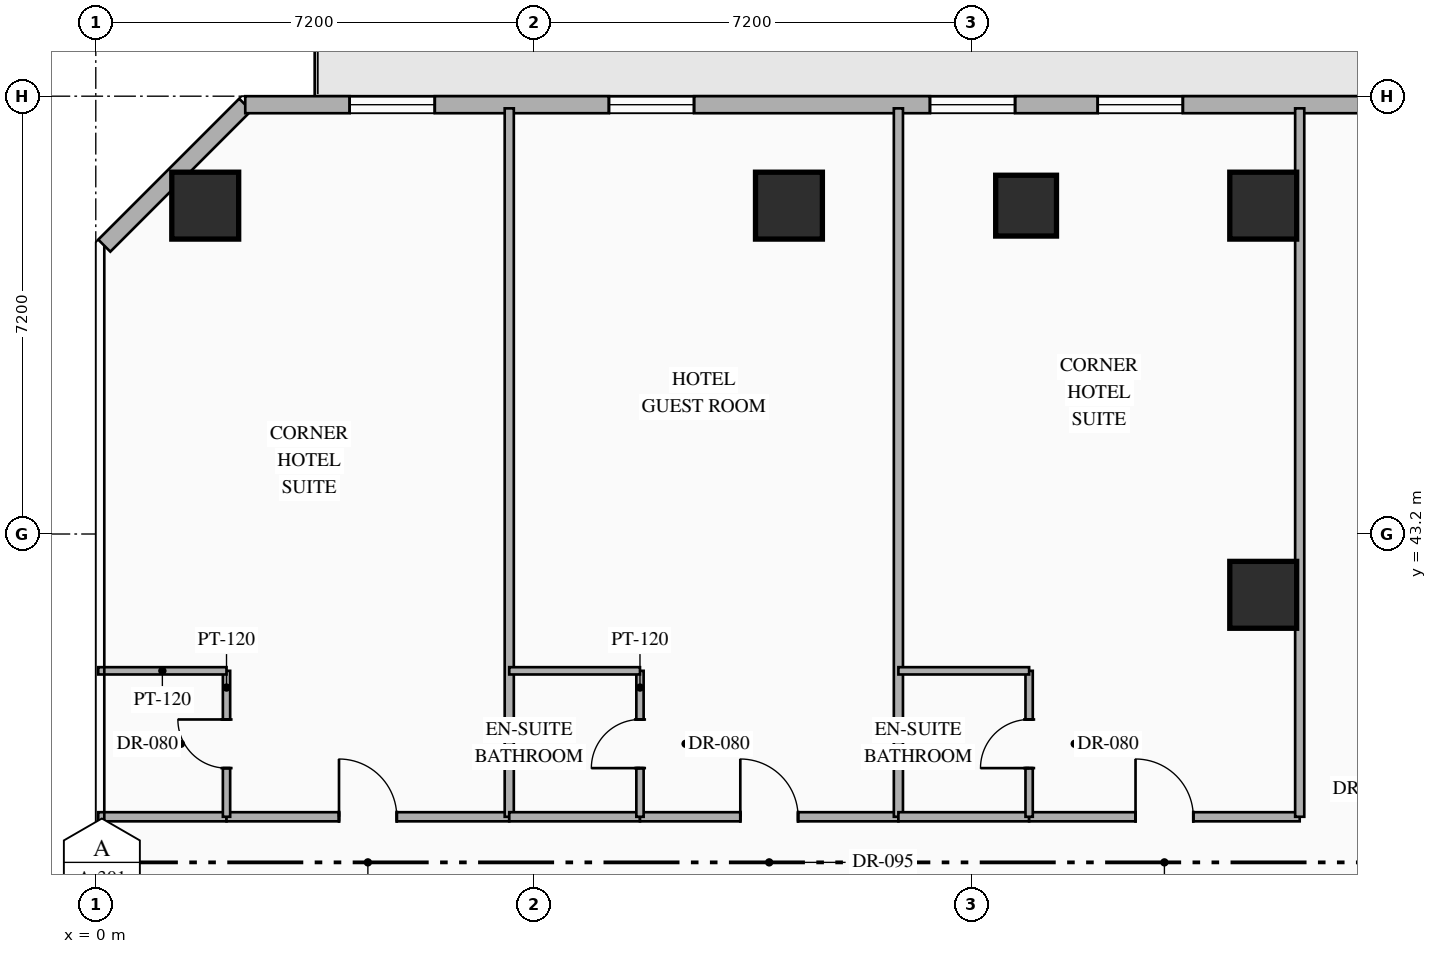
"""IFC4 building model, lengths in metres.
Left out: names, types, materials, properties, quantities, classifications, styles, units other than length and angle.
Written with IfcOpenShell. Run it as: python <this file> out.ifc"""

import sys

from ifc_helpers import new_model, si_unit, direction, frame, frame_2d, origin, origin_2d, place, context, subcontext, project, spatial, rectangle, hollow_rectangle, extrude, element, fill, save


model = new_model("IFC4")
c1 = context("Model", 3, precision=1e-05, world=origin(), true_north=direction((0.0, 1.0)))
c2 = subcontext(c1, "Body", "Model", "MODEL_VIEW")
j1 = project(units=[si_unit("LENGTHUNIT", "METRE"), si_unit("PLANEANGLEUNIT", "RADIAN")], contexts=[c1])
p1 = place(None, origin())
s1 = spatial("IfcSite", under=j1, at=p1, CompositionType="ELEMENT")
p2 = place(p1, origin())
s2 = spatial("IfcBuilding", under=s1, at=p2, CompositionType="ELEMENT")
p3 = place(p2, frame((0.0, 0.0, 63.4)))
s3 = spatial("IfcBuildingStorey", under=s2, at=p3, CompositionType="ELEMENT", Elevation=63.4)
for number, where, z_axis, x_axis in (
    (1, (1.8, 48.6, 0.0), (0.0, 0.0, 1.0), (1.0, 0.0, 0.0)),
    (2, (11.4, 48.6, 0.0), (0.0, 0.0, 1.0), (1.0, 0.0, 0.0)),
    (3, (19.2, 48.6, 0.0), (0.0, 0.0, 1.0), (1.0, 0.0, 0.0)),
    (4, (19.2, 42.2, 0.0), (0.0, 0.0, 1.0), (1.0, 0.0, 0.0)),
):
    element("IfcColumn", number, at=place(p3, frame(where, z_axis=z_axis, x_axis=x_axis)), inside=s3, PredefinedType="COLUMN", context=c2, shape_type="SweptSolid", body=[
        extrude(hollow_rectangle(XDim=1.1, YDim=1.1, WallThickness=0.04, at=origin_2d()), origin(), (0.0, 0.0, 1.0), 3.35),
    ])
p4 = place(p3, frame((15.3, 48.6, 0.0), z_axis=(0.0, 0.0, 1.0), x_axis=(1.0, 0.0, 0.0)))
e5 = element("IfcColumn", 5, at=p4, inside=s3, PredefinedType="COLUMN", context=c2, shape_type="SweptSolid", body=[
    extrude(hollow_rectangle(XDim=1.0, YDim=1.0, WallThickness=0.038, at=origin_2d()), origin(), (0.0, 0.0, 1.0), 3.35),
])
p5 = place(p3, frame((0.14, 47.942, 0.0), z_axis=(0.0, 0.0, 1.0), x_axis=(0.707106781187, 0.707106781187, 0.0)))
e6 = element("IfcWall", 6, at=p5, inside=s3, PredefinedType="STANDARD", context=c2, shape_type="SweptSolid", body=[
    extrude(rectangle(XDim=3.278, YDim=0.28, at=frame_2d((1.639, 0.0))), origin(), (0.0, 0.0, 1.0), 3.13),
])
p6 = place(p3, frame((2.458, 50.26, 0.0), z_axis=(0.0, 0.0, 1.0), x_axis=(1.0, 0.0, 0.0)))
e7 = element("IfcWall", 7, at=p6, inside=s3, PredefinedType="STANDARD", context=c2, shape_type="SweptSolid", body=[
    extrude(rectangle(XDim=40.084, YDim=0.28, at=frame_2d((20.042, 0.0))), origin(), (0.0, 0.0, 1.0), 3.13),
])
p7 = place(p6, frame((25.905, 0.0, 0.0)))
e8 = element("IfcOpeningElement", 8, at=p7, cuts=e7, PredefinedType="OPENING", context=c2, shape_type="SweptSolid", body=[
    extrude(rectangle(XDim=1.1, YDim=2.2, at=frame_2d((0.55, 1.1))), frame((0.0, 0.15, 0.0), z_axis=(0.0, -1.0, 0.0), x_axis=(1.0, 0.0, 0.0)), (0.0, 0.0, 1.0), 0.3),
])
p8 = place(p6, frame((1.717, 0.0, 0.85)))
e9 = element("IfcOpeningElement", 9, at=p8, cuts=e7, PredefinedType="OPENING", context=c2, shape_type="SweptSolid", body=[
    extrude(rectangle(XDim=1.4, YDim=1.8, at=frame_2d((0.7, 0.9))), frame((0.0, 0.15, 0.0), z_axis=(0.0, -1.0, 0.0), x_axis=(1.0, 0.0, 0.0)), (0.0, 0.0, 1.0), 0.3),
])
p9 = place(p6, frame((5.981, 0.0, 0.85)))
e10 = element("IfcOpeningElement", 10, at=p9, cuts=e7, PredefinedType="OPENING", context=c2, shape_type="SweptSolid", body=[
    extrude(rectangle(XDim=1.4, YDim=1.8, at=frame_2d((0.7, 0.9))), frame((0.0, 0.15, 0.0), z_axis=(0.0, -1.0, 0.0), x_axis=(1.0, 0.0, 0.0)), (0.0, 0.0, 1.0), 0.3),
])
p10 = place(p6, frame((11.261, 0.0, 0.85)))
e11 = element("IfcOpeningElement", 11, at=p10, cuts=e7, PredefinedType="OPENING", context=c2, shape_type="SweptSolid", body=[
    extrude(rectangle(XDim=1.4, YDim=1.8, at=frame_2d((0.7, 0.9))), frame((0.0, 0.15, 0.0), z_axis=(0.0, -1.0, 0.0), x_axis=(1.0, 0.0, 0.0)), (0.0, 0.0, 1.0), 0.3),
])
p11 = place(p6, frame((14.02, 0.0, 0.85)))
e12 = element("IfcOpeningElement", 12, at=p11, cuts=e7, PredefinedType="OPENING", context=c2, shape_type="SweptSolid", body=[
    extrude(rectangle(XDim=1.4, YDim=1.8, at=frame_2d((0.7, 0.9))), frame((0.0, 0.15, 0.0), z_axis=(0.0, -1.0, 0.0), x_axis=(1.0, 0.0, 0.0)), (0.0, 0.0, 1.0), 0.3),
])
p12 = place(p6, frame((20.789, 0.0, 0.85)))
e13 = element("IfcOpeningElement", 13, at=p12, cuts=e7, PredefinedType="OPENING", context=c2, shape_type="SweptSolid", body=[
    extrude(rectangle(XDim=1.4, YDim=1.8, at=frame_2d((0.7, 0.9))), frame((0.0, 0.15, 0.0), z_axis=(0.0, -1.0, 0.0), x_axis=(1.0, 0.0, 0.0)), (0.0, 0.0, 1.0), 0.3),
])
p13 = place(p6, frame((32.703, 0.0, 0.85)))
e14 = element("IfcOpeningElement", 14, at=p13, cuts=e7, PredefinedType="OPENING", context=c2, shape_type="SweptSolid", body=[
    extrude(rectangle(XDim=1.4, YDim=1.8, at=frame_2d((0.7, 0.9))), frame((0.0, 0.15, 0.0), z_axis=(0.0, -1.0, 0.0), x_axis=(1.0, 0.0, 0.0)), (0.0, 0.0, 1.0), 0.3),
])
p14 = place(p6, frame((36.967, 0.0, 0.85)))
e15 = element("IfcOpeningElement", 15, at=p14, cuts=e7, PredefinedType="OPENING", context=c2, shape_type="SweptSolid", body=[
    extrude(rectangle(XDim=1.4, YDim=1.8, at=frame_2d((0.7, 0.9))), frame((0.0, 0.15, 0.0), z_axis=(0.0, -1.0, 0.0), x_axis=(1.0, 0.0, 0.0)), (0.0, 0.0, 1.0), 0.3),
])
p15 = place(p3, frame((0.04, 38.55, 0.0), z_axis=(0.0, 0.0, 1.0), x_axis=(1.0, 0.0, 0.0)))
e16 = element("IfcWall", 16, at=p15, inside=s3, PredefinedType="PARTITIONING", context=c2, shape_type="SweptSolid", body=[
    extrude(rectangle(XDim=2.11, YDim=0.15, at=frame_2d((1.055, 0.0))), origin(), (0.0, 0.0, 1.0), 2.775),
])
p16 = place(p3, frame((2.15, 38.55, 0.0), z_axis=(0.0, 0.0, 1.0), x_axis=(1.0, 0.0, 0.0)))
e17 = element("IfcWall", 17, at=p16, inside=s3, PredefinedType="PARTITIONING", context=c2, shape_type="SweptSolid", body=[
    extrude(rectangle(XDim=4.65, YDim=0.15, at=frame_2d((2.325, 0.0))), origin(), (0.0, 0.0, 1.0), 2.775),
])
p17 = place(p16, frame((1.85, 0.0, 0.0)))
e18 = element("IfcOpeningElement", 18, at=p17, cuts=e17, PredefinedType="OPENING", context=c2, shape_type="SweptSolid", body=[
    extrude(rectangle(XDim=0.95, YDim=2.15, at=frame_2d((0.475, 1.075))), frame((0.0, 0.085, 0.0), z_axis=(0.0, -1.0, 0.0), x_axis=(1.0, 0.0, 0.0)), (0.0, 0.0, 1.0), 0.17),
])
p18 = place(p3, frame((2.15, 38.55, 0.0), z_axis=(0.0, 0.0, 1.0), x_axis=(0.0, 1.0, 0.0)))
e19 = element("IfcWall", 19, at=p18, inside=s3, PredefinedType="PARTITIONING", context=c2, shape_type="SweptSolid", body=[
    extrude(rectangle(XDim=2.4, YDim=0.12, at=frame_2d((1.2, 0.0))), origin(), (0.0, 0.0, 1.0), 3.13),
])
p19 = place(p18, frame((0.8, 0.0, 0.0)))
e20 = element("IfcOpeningElement", 20, at=p19, cuts=e19, PredefinedType="OPENING", context=c2, shape_type="SweptSolid", body=[
    extrude(rectangle(XDim=0.8, YDim=2.06, at=frame_2d((0.4, 1.03))), frame((0.0, 0.07, 0.0), z_axis=(0.0, -1.0, 0.0), x_axis=(1.0, 0.0, 0.0)), (0.0, 0.0, 1.0), 0.14),
])
p20 = place(p3, frame((0.04, 40.95, 0.0), z_axis=(0.0, 0.0, 1.0), x_axis=(1.0, 0.0, 0.0)))
e21 = element("IfcWall", 21, at=p20, inside=s3, PredefinedType="PARTITIONING", context=c2, shape_type="SweptSolid", body=[
    extrude(rectangle(XDim=2.11, YDim=0.12, at=frame_2d((1.055, 0.0))), origin(), (0.0, 0.0, 1.0), 2.775),
])
p21 = place(p3, frame((6.8, 38.55, 0.0), z_axis=(0.0, 0.0, 1.0), x_axis=(0.0, 1.0, 0.0)))
e22 = element("IfcWall", 22, at=p21, inside=s3, PredefinedType="PARTITIONING", context=c2, shape_type="SweptSolid", body=[
    extrude(rectangle(XDim=11.65, YDim=0.15, at=frame_2d((5.825, 0.0))), origin(), (0.0, 0.0, 1.0), 3.13),
])
p22 = place(p3, frame((6.8, 38.55, 0.0), z_axis=(0.0, 0.0, 1.0), x_axis=(1.0, 0.0, 0.0)))
e23 = element("IfcWall", 23, at=p22, inside=s3, PredefinedType="PARTITIONING", context=c2, shape_type="SweptSolid", body=[
    extrude(rectangle(XDim=2.15, YDim=0.15, at=frame_2d((1.075, 0.0))), origin(), (0.0, 0.0, 1.0), 2.775),
])
p23 = place(p3, frame((8.95, 38.55, 0.0), z_axis=(0.0, 0.0, 1.0), x_axis=(1.0, 0.0, 0.0)))
e24 = element("IfcWall", 24, at=p23, inside=s3, PredefinedType="PARTITIONING", context=c2, shape_type="SweptSolid", body=[
    extrude(rectangle(XDim=4.25, YDim=0.15, at=frame_2d((2.125, 0.0))), origin(), (0.0, 0.0, 1.0), 2.775),
])
p24 = place(p23, frame((1.65, 0.0, 0.0)))
e25 = element("IfcOpeningElement", 25, at=p24, cuts=e24, PredefinedType="OPENING", context=c2, shape_type="SweptSolid", body=[
    extrude(rectangle(XDim=0.95, YDim=2.15, at=frame_2d((0.475, 1.075))), frame((0.0, 0.085, 0.0), z_axis=(0.0, -1.0, 0.0), x_axis=(1.0, 0.0, 0.0)), (0.0, 0.0, 1.0), 0.17),
])
p25 = place(p3, frame((8.95, 38.55, 0.0), z_axis=(0.0, 0.0, 1.0), x_axis=(0.0, 1.0, 0.0)))
e26 = element("IfcWall", 26, at=p25, inside=s3, PredefinedType="PARTITIONING", context=c2, shape_type="SweptSolid", body=[
    extrude(rectangle(XDim=2.4, YDim=0.12, at=frame_2d((1.2, 0.0))), origin(), (0.0, 0.0, 1.0), 3.13),
])
p26 = place(p25, frame((0.8, 0.0, 0.0)))
e27 = element("IfcOpeningElement", 27, at=p26, cuts=e26, PredefinedType="OPENING", context=c2, shape_type="SweptSolid", body=[
    extrude(rectangle(XDim=0.8, YDim=2.06, at=frame_2d((0.4, 1.03))), frame((0.0, 0.07, 0.0), z_axis=(0.0, -1.0, 0.0), x_axis=(1.0, 0.0, 0.0)), (0.0, 0.0, 1.0), 0.14),
])
p27 = place(p3, frame((6.8, 40.95, 0.0), z_axis=(0.0, 0.0, 1.0), x_axis=(1.0, 0.0, 0.0)))
e28 = element("IfcWall", 28, at=p27, inside=s3, PredefinedType="PARTITIONING", context=c2, shape_type="SweptSolid", body=[
    extrude(rectangle(XDim=2.15, YDim=0.12, at=frame_2d((1.075, 0.0))), origin(), (0.0, 0.0, 1.0), 2.775),
])
p28 = place(p3, frame((13.2, 38.55, 0.0), z_axis=(0.0, 0.0, 1.0), x_axis=(0.0, 1.0, 0.0)))
e29 = element("IfcWall", 29, at=p28, inside=s3, PredefinedType="PARTITIONING", context=c2, shape_type="SweptSolid", body=[
    extrude(rectangle(XDim=11.65, YDim=0.15, at=frame_2d((5.825, 0.0))), origin(), (0.0, 0.0, 1.0), 3.13),
])
p29 = place(p3, frame((13.2, 38.55, 0.0), z_axis=(0.0, 0.0, 1.0), x_axis=(1.0, 0.0, 0.0)))
e30 = element("IfcWall", 30, at=p29, inside=s3, PredefinedType="PARTITIONING", context=c2, shape_type="SweptSolid", body=[
    extrude(rectangle(XDim=2.15, YDim=0.15, at=frame_2d((1.075, 0.0))), origin(), (0.0, 0.0, 1.0), 2.775),
])
p30 = place(p3, frame((15.35, 38.55, 0.0), z_axis=(0.0, 0.0, 1.0), x_axis=(1.0, 0.0, 0.0)))
e31 = element("IfcWall", 31, at=p30, inside=s3, PredefinedType="PARTITIONING", context=c2, shape_type="SweptSolid", body=[
    extrude(rectangle(XDim=4.45, YDim=0.15, at=frame_2d((2.225, 0.0))), origin(), (0.0, 0.0, 1.0), 2.775),
])
p31 = place(p30, frame((1.75, 0.0, 0.0)))
e32 = element("IfcOpeningElement", 32, at=p31, cuts=e31, PredefinedType="OPENING", context=c2, shape_type="SweptSolid", body=[
    extrude(rectangle(XDim=0.95, YDim=2.15, at=frame_2d((0.475, 1.075))), frame((0.0, 0.085, 0.0), z_axis=(0.0, -1.0, 0.0), x_axis=(1.0, 0.0, 0.0)), (0.0, 0.0, 1.0), 0.17),
])
p32 = place(p3, frame((15.35, 38.55, 0.0), z_axis=(0.0, 0.0, 1.0), x_axis=(0.0, 1.0, 0.0)))
e33 = element("IfcWall", 33, at=p32, inside=s3, PredefinedType="PARTITIONING", context=c2, shape_type="SweptSolid", body=[
    extrude(rectangle(XDim=2.4, YDim=0.12, at=frame_2d((1.2, 0.0))), origin(), (0.0, 0.0, 1.0), 3.13),
])
p33 = place(p32, frame((0.8, 0.0, 0.0)))
e34 = element("IfcOpeningElement", 34, at=p33, cuts=e33, PredefinedType="OPENING", context=c2, shape_type="SweptSolid", body=[
    extrude(rectangle(XDim=0.8, YDim=2.06, at=frame_2d((0.4, 1.03))), frame((0.0, 0.07, 0.0), z_axis=(0.0, -1.0, 0.0), x_axis=(1.0, 0.0, 0.0)), (0.0, 0.0, 1.0), 0.14),
])
p34 = place(p3, frame((13.2, 40.95, 0.0), z_axis=(0.0, 0.0, 1.0), x_axis=(1.0, 0.0, 0.0)))
e35 = element("IfcWall", 35, at=p34, inside=s3, PredefinedType="PARTITIONING", context=c2, shape_type="SweptSolid", body=[
    extrude(rectangle(XDim=2.15, YDim=0.12, at=frame_2d((1.075, 0.0))), origin(), (0.0, 0.0, 1.0), 2.775),
])
p35 = place(p3, frame((19.8, 38.55, 0.0), z_axis=(0.0, 0.0, 1.0), x_axis=(0.0, 1.0, 0.0)))
e36 = element("IfcWall", 36, at=p35, inside=s3, PredefinedType="PARTITIONING", context=c2, shape_type="SweptSolid", body=[
    extrude(rectangle(XDim=11.65, YDim=0.15, at=frame_2d((5.825, 0.0))), origin(), (0.0, 0.0, 1.0), 3.13),
])
p36 = place(p8, origin())
e37 = element("IfcWindow", 37, at=p36, inside=s3, PartitioningType="SINGLE_PANEL", PredefinedType="WINDOW", context=c2, shape_type="SweptSolid", body=[
    extrude(rectangle(XDim=1.4, YDim=1.8, at=frame_2d((0.7, 0.9))), frame((0.0, 0.03, 0.0), z_axis=(0.0, -1.0, 0.0), x_axis=(1.0, 0.0, 0.0)), (0.0, 0.0, 1.0), 0.06),
])
fill(e9, e37)
p37 = place(p9, origin())
e38 = element("IfcWindow", 38, at=p37, inside=s3, PartitioningType="SINGLE_PANEL", PredefinedType="WINDOW", context=c2, shape_type="SweptSolid", body=[
    extrude(rectangle(XDim=1.4, YDim=1.8, at=frame_2d((0.7, 0.9))), frame((0.0, 0.03, 0.0), z_axis=(0.0, -1.0, 0.0), x_axis=(1.0, 0.0, 0.0)), (0.0, 0.0, 1.0), 0.06),
])
fill(e10, e38)
p38 = place(p10, origin())
e39 = element("IfcWindow", 39, at=p38, inside=s3, PartitioningType="SINGLE_PANEL", PredefinedType="WINDOW", context=c2, shape_type="SweptSolid", body=[
    extrude(rectangle(XDim=1.4, YDim=1.8, at=frame_2d((0.7, 0.9))), frame((0.0, 0.03, 0.0), z_axis=(0.0, -1.0, 0.0), x_axis=(1.0, 0.0, 0.0)), (0.0, 0.0, 1.0), 0.06),
])
fill(e11, e39)
p39 = place(p11, origin())
e40 = element("IfcWindow", 40, at=p39, inside=s3, PartitioningType="SINGLE_PANEL", PredefinedType="WINDOW", context=c2, shape_type="SweptSolid", body=[
    extrude(rectangle(XDim=1.4, YDim=1.8, at=frame_2d((0.7, 0.9))), frame((0.0, 0.03, 0.0), z_axis=(0.0, -1.0, 0.0), x_axis=(1.0, 0.0, 0.0)), (0.0, 0.0, 1.0), 0.06),
])
fill(e12, e40)
p40 = place(p17, origin())
e41 = element("IfcDoor", 41, at=p40, inside=s3, OperationType="SINGLE_SWING_LEFT", PredefinedType="DOOR", context=c2, shape_type="SweptSolid", body=[
    extrude(rectangle(XDim=0.95, YDim=2.15, at=frame_2d((0.475, 1.075))), frame((0.0, 0.025, 0.0), z_axis=(0.0, -1.0, 0.0), x_axis=(1.0, 0.0, 0.0)), (0.0, 0.0, 1.0), 0.05),
])
fill(e18, e41)
p41 = place(p19, origin())
e42 = element("IfcDoor", 42, at=p41, inside=s3, OperationType="SINGLE_SWING_RIGHT", PredefinedType="DOOR", context=c2, shape_type="SweptSolid", body=[
    extrude(rectangle(XDim=0.8, YDim=2.06, at=frame_2d((0.4, 1.03))), frame((0.0, 0.025, 0.0), z_axis=(0.0, -1.0, 0.0), x_axis=(1.0, 0.0, 0.0)), (0.0, 0.0, 1.0), 0.05),
])
fill(e20, e42)
p42 = place(p24, origin())
e43 = element("IfcDoor", 43, at=p42, inside=s3, OperationType="SINGLE_SWING_LEFT", PredefinedType="DOOR", context=c2, shape_type="SweptSolid", body=[
    extrude(rectangle(XDim=0.95, YDim=2.15, at=frame_2d((0.475, 1.075))), frame((0.0, 0.025, 0.0), z_axis=(0.0, -1.0, 0.0), x_axis=(1.0, 0.0, 0.0)), (0.0, 0.0, 1.0), 0.05),
])
fill(e25, e43)
p43 = place(p26, origin())
e44 = element("IfcDoor", 44, at=p43, inside=s3, OperationType="SINGLE_SWING_LEFT", PredefinedType="DOOR", context=c2, shape_type="SweptSolid", body=[
    extrude(rectangle(XDim=0.8, YDim=2.06, at=frame_2d((0.4, 1.03))), frame((0.0, 0.025, 0.0), z_axis=(0.0, -1.0, 0.0), x_axis=(1.0, 0.0, 0.0)), (0.0, 0.0, 1.0), 0.05),
])
fill(e27, e44)
p44 = place(p31, origin())
e45 = element("IfcDoor", 45, at=p44, inside=s3, OperationType="SINGLE_SWING_LEFT", PredefinedType="DOOR", context=c2, shape_type="SweptSolid", body=[
    extrude(rectangle(XDim=0.95, YDim=2.15, at=frame_2d((0.475, 1.075))), frame((0.0, 0.025, 0.0), z_axis=(0.0, -1.0, 0.0), x_axis=(1.0, 0.0, 0.0)), (0.0, 0.0, 1.0), 0.05),
])
fill(e32, e45)
p45 = place(p33, origin())
e46 = element("IfcDoor", 46, at=p45, inside=s3, OperationType="SINGLE_SWING_LEFT", PredefinedType="DOOR", context=c2, shape_type="SweptSolid", body=[
    extrude(rectangle(XDim=0.8, YDim=2.06, at=frame_2d((0.4, 1.03))), frame((0.0, 0.025, 0.0), z_axis=(0.0, -1.0, 0.0), x_axis=(1.0, 0.0, 0.0)), (0.0, 0.0, 1.0), 0.05),
])
fill(e34, e46)
save(model, sys.argv[1])
